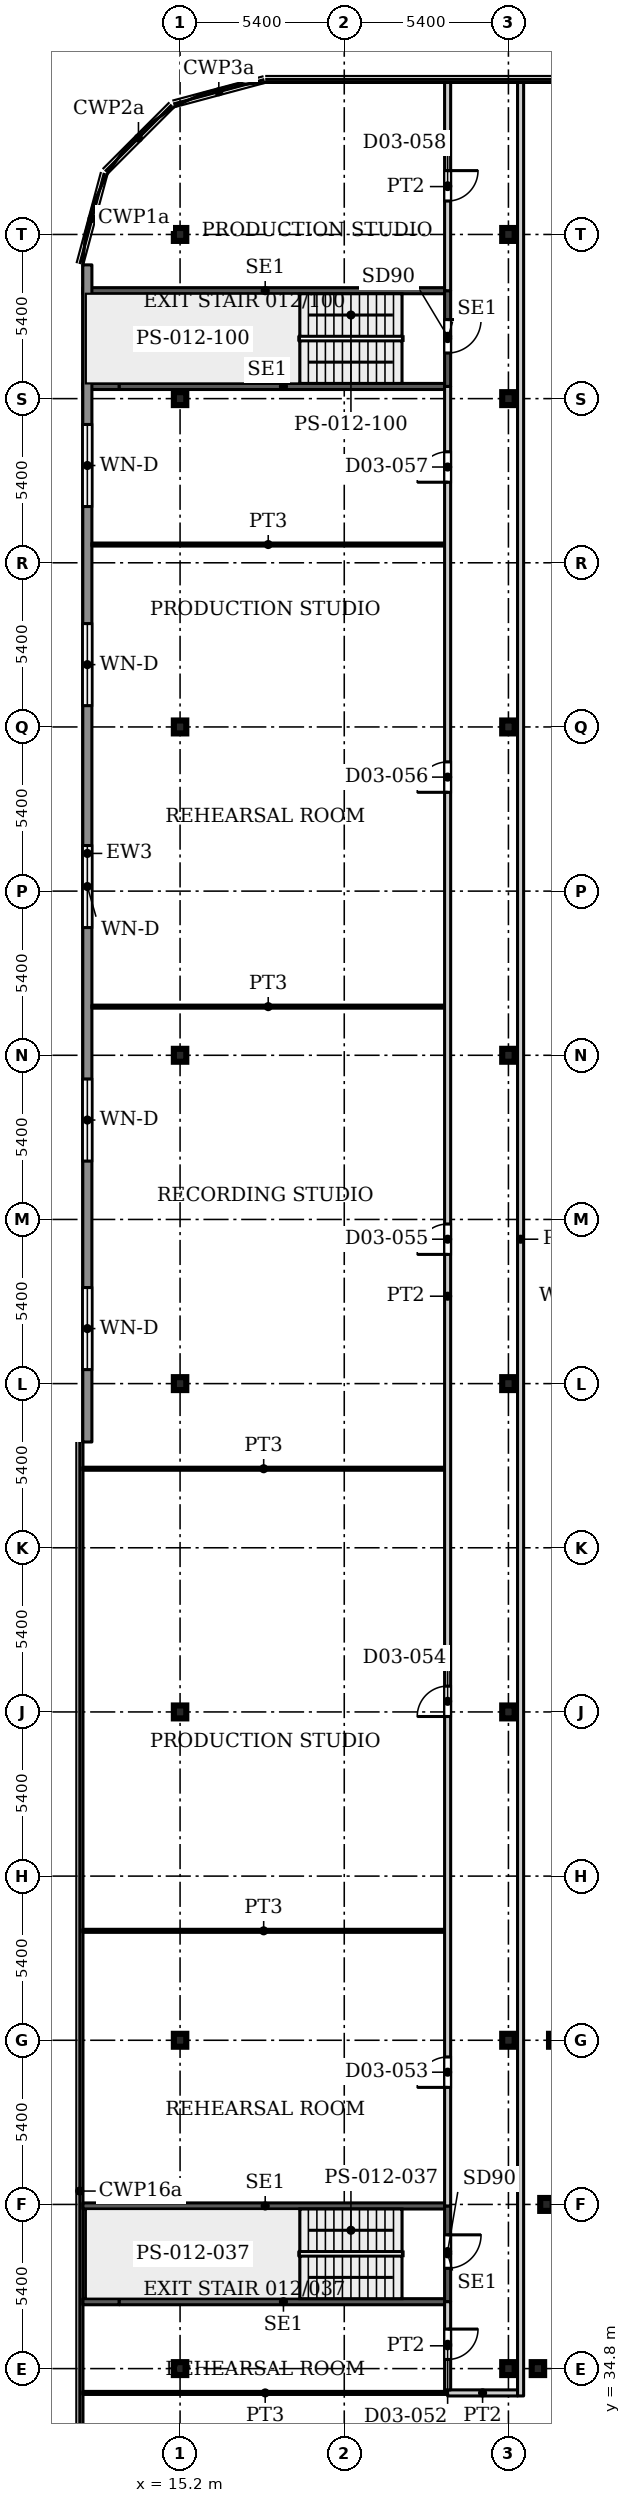
"""IFC4 building model, lengths in metres.
Left out: names, types, materials, properties, quantities, classifications, styles, units other than length and angle.
Written with IfcOpenShell. Run it as: python <this file> out.ifc"""

import sys

from ifc_helpers import new_model, si_unit, direction, frame, frame_2d, origin, origin_2d, place, context, subcontext, project, spatial, rectangle, i_section, extrude, source, transform, mapped, element, fill, save


model = new_model("IFC4")
c1 = context("Model", 3, precision=1e-05, world=origin(), true_north=direction((0.0, 1.0)))
c2 = subcontext(c1, "Body", "Model", "MODEL_VIEW")
j1 = project(units=[si_unit("LENGTHUNIT", "METRE"), si_unit("PLANEANGLEUNIT", "RADIAN")], contexts=[c1])
p1 = place(None, origin())
s1 = spatial("IfcSite", under=j1, at=p1, CompositionType="ELEMENT")
p2 = place(p1, origin())
s2 = spatial("IfcBuilding", under=s1, at=p2, CompositionType="ELEMENT")
p3 = place(p2, frame((0.0, 0.0, 17.0)))
s3 = spatial("IfcBuildingStorey", under=s2, at=p3, CompositionType="ELEMENT", Elevation=17.0)
for number, where, z_axis, x_axis in (
    (1, (15.2, 34.8, 0.0), (0.0, 0.0, 1.0), (1.0, 0.0, 0.0)),
    (2, (26.0, 34.8, 0.0), (0.0, 0.0, 1.0), (1.0, 0.0, 0.0)),
    (3, (15.2, 45.6, 0.0), (0.0, 0.0, 1.0), (1.0, 0.0, 0.0)),
    (4, (26.0, 45.6, 0.0), (0.0, 0.0, 1.0), (1.0, 0.0, 0.0)),
    (5, (15.2, 56.4, 0.0), (0.0, 0.0, 1.0), (1.0, 0.0, 0.0)),
    (6, (26.0, 56.4, 0.0), (0.0, 0.0, 1.0), (1.0, 0.0, 0.0)),
    (7, (15.2, 67.2, 0.0), (0.0, 0.0, 1.0), (1.0, 0.0, 0.0)),
    (8, (26.0, 67.2, 0.0), (0.0, 0.0, 1.0), (1.0, 0.0, 0.0)),
    (9, (15.2, 78.0, 0.0), (0.0, 0.0, 1.0), (1.0, 0.0, 0.0)),
    (10, (26.0, 78.0, 0.0), (0.0, 0.0, 1.0), (1.0, 0.0, 0.0)),
    (11, (15.2, 88.8, 0.0), (0.0, 0.0, 1.0), (1.0, 0.0, 0.0)),
    (12, (26.0, 88.8, 0.0), (0.0, 0.0, 1.0), (1.0, 0.0, 0.0)),
    (13, (15.2, 99.6, 0.0), (0.0, 0.0, 1.0), (1.0, 0.0, 0.0)),
    (14, (26.0, 99.6, 0.0), (0.0, 0.0, 1.0), (1.0, 0.0, 0.0)),
    (15, (15.2, 105.0, 0.0), (0.0, 0.0, 1.0), (1.0, 0.0, 0.0)),
    (16, (26.0, 105.0, 0.0), (0.0, 0.0, 1.0), (1.0, 0.0, 0.0)),
    (17, (26.97, 34.8, 0.0), (0.0, 0.0, 1.0), (1.0, 0.0, 0.0)),
    (18, (27.25, 40.2, 0.0), (0.0, 0.0, 1.0), (1.0, 0.0, 0.0)),
    (19, (27.54, 45.6, 0.0), (0.0, 0.0, 1.0), (1.0, 0.0, 0.0)),
):
    element("IfcColumn", number, at=place(p3, frame(where, z_axis=z_axis, x_axis=x_axis)), inside=s3, PredefinedType="COLUMN", context=c2, shape_type="SweptSolid", body=[
        extrude(i_section(OverallWidth=0.409, OverallDepth=0.425, WebThickness=0.033, FlangeThickness=0.052, FilletRadius=0.013, at=origin_2d()), origin(), (0.0, 0.0, 1.0), 4.5),
    ])
p4 = place(p3, frame((12.15, 65.28, 0.0), z_axis=(0.0, 0.0, 1.0), x_axis=(0.0, 1.0, 0.0)))
e20 = element("IfcWall", 20, at=p4, inside=s3, PredefinedType="SOLIDWALL", context=c2, shape_type="SweptSolid", body=[
    extrude(rectangle(XDim=38.72, YDim=0.3, at=frame_2d((19.36, 0.0))), origin(), (0.0, 0.0, 1.0), 4.25),
])
p5 = place(p4, frame((2.38, 0.0, 0.9)))
e21 = element("IfcOpeningElement", 21, at=p5, cuts=e20, PredefinedType="OPENING", context=c2, shape_type="SweptSolid", body=[
    extrude(rectangle(XDim=2.7, YDim=2.1, at=frame_2d((1.35, 1.05))), frame((0.0, 0.16, 0.0), z_axis=(0.0, -1.0, 0.0), x_axis=(1.0, 0.0, 0.0)), (0.0, 0.0, 1.0), 0.32),
])
p6 = place(p4, frame((9.24, 0.0, 0.9)))
e22 = element("IfcOpeningElement", 22, at=p6, cuts=e20, PredefinedType="OPENING", context=c2, shape_type="SweptSolid", body=[
    extrude(rectangle(XDim=2.7, YDim=2.1, at=frame_2d((1.35, 1.05))), frame((0.0, 0.16, 0.0), z_axis=(0.0, -1.0, 0.0), x_axis=(1.0, 0.0, 0.0)), (0.0, 0.0, 1.0), 0.32),
])
p7 = place(p4, frame((16.92, 0.0, 0.9)))
e23 = element("IfcOpeningElement", 23, at=p7, cuts=e20, PredefinedType="OPENING", context=c2, shape_type="SweptSolid", body=[
    extrude(rectangle(XDim=2.7, YDim=2.1, at=frame_2d((1.35, 1.05))), frame((0.0, 0.16, 0.0), z_axis=(0.0, -1.0, 0.0), x_axis=(1.0, 0.0, 0.0)), (0.0, 0.0, 1.0), 0.32),
])
p8 = place(p4, frame((24.22, 0.0, 0.9)))
e24 = element("IfcOpeningElement", 24, at=p8, cuts=e20, PredefinedType="OPENING", context=c2, shape_type="SweptSolid", body=[
    extrude(rectangle(XDim=2.7, YDim=2.1, at=frame_2d((1.35, 1.05))), frame((0.0, 0.16, 0.0), z_axis=(0.0, -1.0, 0.0), x_axis=(1.0, 0.0, 0.0)), (0.0, 0.0, 1.0), 0.32),
])
p9 = place(p4, frame((30.77, 0.0, 0.9)))
e25 = element("IfcOpeningElement", 25, at=p9, cuts=e20, PredefinedType="OPENING", context=c2, shape_type="SweptSolid", body=[
    extrude(rectangle(XDim=2.7, YDim=2.1, at=frame_2d((1.35, 1.05))), frame((0.0, 0.16, 0.0), z_axis=(0.0, -1.0, 0.0), x_axis=(1.0, 0.0, 0.0)), (0.0, 0.0, 1.0), 0.32),
])
p10 = place(p3, frame((12.0, 37.0, 0.0), z_axis=(0.0, 0.0, 1.0), x_axis=(1.0, 0.0, 0.0)))
e26 = element("IfcWall", 26, at=p10, inside=s3, PredefinedType="SHEAR", context=c2, shape_type="SweptSolid", body=[
    extrude(rectangle(XDim=1.2, YDim=0.2, at=frame_2d((0.6, 0.0))), origin(), (0.0, 0.0, 1.0), 4.5),
])
p11 = place(p3, frame((13.2, 37.0, 0.0), z_axis=(0.0, 0.0, 1.0), x_axis=(1.0, 0.0, 0.0)))
e27 = element("IfcWall", 27, at=p11, inside=s3, PredefinedType="SHEAR", context=c2, shape_type="SweptSolid", body=[
    extrude(rectangle(XDim=10.8, YDim=0.2, at=frame_2d((5.4, 0.0))), origin(), (0.0, 0.0, 1.0), 4.5),
])
p12 = place(p3, frame((12.0, 40.15, 0.0), z_axis=(0.0, 0.0, 1.0), x_axis=(1.0, 0.0, 0.0)))
e28 = element("IfcWall", 28, at=p12, inside=s3, PredefinedType="SHEAR", context=c2, shape_type="SweptSolid", body=[
    extrude(rectangle(XDim=12.0, YDim=0.2, at=frame_2d((6.0, 0.0))), origin(), (0.0, 0.0, 1.0), 4.5),
])
p13 = place(p3, frame((24.0, 37.0, 0.0), z_axis=(0.0, 0.0, 1.0), x_axis=(0.0, 1.0, 0.0)))
e29 = element("IfcWall", 29, at=p13, inside=s3, PredefinedType="SHEAR", context=c2, shape_type="SweptSolid", body=[
    extrude(rectangle(XDim=3.15, YDim=0.2, at=frame_2d((1.575, 0.0))), origin(), (0.0, 0.0, 1.0), 4.5),
])
p14 = place(p13, frame((1.1, 0.0, 0.0)))
e30 = element("IfcOpeningElement", 30, at=p14, cuts=e29, PredefinedType="OPENING", context=c2, shape_type="SweptSolid", body=[
    extrude(rectangle(XDim=1.1, YDim=2.2, at=frame_2d((0.55, 1.1))), frame((0.0, 0.11, 0.0), z_axis=(0.0, -1.0, 0.0), x_axis=(1.0, 0.0, 0.0)), (0.0, 0.0, 1.0), 0.22),
])
p15 = place(p3, frame((12.0, 100.0, 0.0), z_axis=(0.0, 0.0, 1.0), x_axis=(1.0, 0.0, 0.0)))
e31 = element("IfcWall", 31, at=p15, inside=s3, PredefinedType="SHEAR", context=c2, shape_type="SweptSolid", body=[
    extrude(rectangle(XDim=1.2, YDim=0.2, at=frame_2d((0.6, 0.0))), origin(), (0.0, 0.0, 1.0), 4.5),
])
p16 = place(p3, frame((13.2, 100.0, 0.0), z_axis=(0.0, 0.0, 1.0), x_axis=(1.0, 0.0, 0.0)))
e32 = element("IfcWall", 32, at=p16, inside=s3, PredefinedType="SHEAR", context=c2, shape_type="SweptSolid", body=[
    extrude(rectangle(XDim=10.8, YDim=0.2, at=frame_2d((5.4, 0.0))), origin(), (0.0, 0.0, 1.0), 4.5),
])
p17 = place(p3, frame((12.0, 103.15, 0.0), z_axis=(0.0, 0.0, 1.0), x_axis=(1.0, 0.0, 0.0)))
e33 = element("IfcWall", 33, at=p17, inside=s3, PredefinedType="SHEAR", context=c2, shape_type="SweptSolid", body=[
    extrude(rectangle(XDim=12.0, YDim=0.2, at=frame_2d((6.0, 0.0))), origin(), (0.0, 0.0, 1.0), 4.5),
])
p18 = place(p3, frame((24.0, 100.0, 0.0), z_axis=(0.0, 0.0, 1.0), x_axis=(0.0, 1.0, 0.0)))
e34 = element("IfcWall", 34, at=p18, inside=s3, PredefinedType="SHEAR", context=c2, shape_type="SweptSolid", body=[
    extrude(rectangle(XDim=3.15, YDim=0.2, at=frame_2d((1.575, 0.0))), origin(), (0.0, 0.0, 1.0), 4.5),
])
p19 = place(p18, frame((1.1, 0.0, 0.0)))
e35 = element("IfcOpeningElement", 35, at=p19, cuts=e34, PredefinedType="OPENING", context=c2, shape_type="SweptSolid", body=[
    extrude(rectangle(XDim=1.1, YDim=2.2, at=frame_2d((0.55, 1.1))), frame((0.0, 0.11, 0.0), z_axis=(0.0, -1.0, 0.0), x_axis=(1.0, 0.0, 0.0)), (0.0, 0.0, 1.0), 0.22),
])
p20 = place(p3, frame((12.0, 34.0, 0.0), z_axis=(0.0, 0.0, 1.0), x_axis=(1.0, 0.0, 0.0)))
e36 = element("IfcWall", 36, at=p20, inside=s3, PredefinedType="PARTITIONING", context=c2, shape_type="SweptSolid", body=[
    extrude(rectangle(XDim=12.0, YDim=0.1, at=frame_2d((6.0, 0.0))), origin(), (0.0, 0.0, 1.0), 4.18),
])
for number, where, z_axis, x_axis in (
    (37, (12.0, 49.2, 0.0), (0.0, 0.0, 1.0), (1.0, 0.0, 0.0)),
    (38, (12.0, 64.4, 0.0), (0.0, 0.0, 1.0), (1.0, 0.0, 0.0)),
):
    element("IfcWall", number, at=place(p3, frame(where, z_axis=z_axis, x_axis=x_axis)), inside=s3, PredefinedType="PARTITIONING", context=c2, shape_type="SweptSolid", body=[
        extrude(rectangle(XDim=11.9, YDim=0.1, at=frame_2d((5.95, 0.0))), origin(), (0.0, 0.0, 1.0), 4.18),
    ])
for number, where, z_axis, x_axis in (
    (39, (12.299, 79.6, 0.0), (0.0, 0.0, 1.0), (1.0, 0.0, 0.0)),
    (40, (12.299, 94.8, 0.0), (0.0, 0.0, 1.0), (1.0, 0.0, 0.0)),
):
    element("IfcWall", number, at=place(p3, frame(where, z_axis=z_axis, x_axis=x_axis)), inside=s3, PredefinedType="PARTITIONING", context=c2, shape_type="SweptSolid", body=[
        extrude(rectangle(XDim=11.601, YDim=0.1, at=frame_2d((5.8, 0.0))), origin(), (0.0, 0.0, 1.0), 4.18),
    ])
p21 = place(p3, frame((24.0, 34.0, 0.0), z_axis=(0.0, 0.0, 1.0), x_axis=(1.0, 0.0, 0.0)))
e41 = element("IfcWall", 41, at=p21, inside=s3, PredefinedType="PARTITIONING", context=c2, shape_type="SweptSolid", body=[
    extrude(rectangle(XDim=2.3, YDim=0.2, at=frame_2d((1.15, 0.0))), origin(), (0.0, 0.0, 1.0), 4.18),
])
p22 = place(p3, frame((24.0, 34.1, 0.0), z_axis=(0.0, 0.0, 1.0), x_axis=(0.0, 1.0, 0.0)))
e42 = element("IfcWall", 42, at=p22, inside=s3, PredefinedType="PARTITIONING", context=c2, shape_type="SweptSolid", body=[
    extrude(rectangle(XDim=2.9, YDim=0.2, at=frame_2d((1.45, 0.0))), origin(), (0.0, 0.0, 1.0), 4.18),
])
p23 = place(p22, frame((1.0, 0.0, 0.0)))
e43 = element("IfcOpeningElement", 43, at=p23, cuts=e42, PredefinedType="OPENING", context=c2, shape_type="SweptSolid", body=[
    extrude(rectangle(XDim=1.0, YDim=2.1, at=frame_2d((0.5, 1.05))), frame((0.0, 0.11, 0.0), z_axis=(0.0, -1.0, 0.0), x_axis=(1.0, 0.0, 0.0)), (0.0, 0.0, 1.0), 0.22),
])
p24 = place(p3, frame((24.0, 40.15, 0.0), z_axis=(0.0, 0.0, 1.0), x_axis=(0.0, 1.0, 0.0)))
e44 = element("IfcWall", 44, at=p24, inside=s3, PredefinedType="PARTITIONING", context=c2, shape_type="SweptSolid", body=[
    extrude(rectangle(XDim=59.85, YDim=0.2, at=frame_2d((29.925, 0.0))), origin(), (0.0, 0.0, 1.0), 4.18),
])
p25 = place(p24, frame((3.9, 0.0, 0.0)))
e45 = element("IfcOpeningElement", 45, at=p25, cuts=e44, PredefinedType="OPENING", context=c2, shape_type="SweptSolid", body=[
    extrude(rectangle(XDim=1.0, YDim=2.1, at=frame_2d((0.5, 1.05))), frame((0.0, 0.11, 0.0), z_axis=(0.0, -1.0, 0.0), x_axis=(1.0, 0.0, 0.0)), (0.0, 0.0, 1.0), 0.22),
])
p26 = place(p24, frame((16.1, 0.0, 0.0)))
e46 = element("IfcOpeningElement", 46, at=p26, cuts=e44, PredefinedType="OPENING", context=c2, shape_type="SweptSolid", body=[
    extrude(rectangle(XDim=1.0, YDim=2.1, at=frame_2d((0.5, 1.05))), frame((0.0, 0.11, 0.0), z_axis=(0.0, -1.0, 0.0), x_axis=(1.0, 0.0, 0.0)), (0.0, 0.0, 1.0), 0.22),
])
p27 = place(p24, frame((31.3, 0.0, 0.0)))
e47 = element("IfcOpeningElement", 47, at=p27, cuts=e44, PredefinedType="OPENING", context=c2, shape_type="SweptSolid", body=[
    extrude(rectangle(XDim=1.0, YDim=2.1, at=frame_2d((0.5, 1.05))), frame((0.0, 0.11, 0.0), z_axis=(0.0, -1.0, 0.0), x_axis=(1.0, 0.0, 0.0)), (0.0, 0.0, 1.0), 0.22),
])
p28 = place(p24, frame((46.5, 0.0, 0.0)))
e48 = element("IfcOpeningElement", 48, at=p28, cuts=e44, PredefinedType="OPENING", context=c2, shape_type="SweptSolid", body=[
    extrude(rectangle(XDim=1.0, YDim=2.1, at=frame_2d((0.5, 1.05))), frame((0.0, 0.11, 0.0), z_axis=(0.0, -1.0, 0.0), x_axis=(1.0, 0.0, 0.0)), (0.0, 0.0, 1.0), 0.22),
])
p29 = place(p24, frame((56.7, 0.0, 0.0)))
e49 = element("IfcOpeningElement", 49, at=p29, cuts=e44, PredefinedType="OPENING", context=c2, shape_type="SweptSolid", body=[
    extrude(rectangle(XDim=1.0, YDim=2.1, at=frame_2d((0.5, 1.05))), frame((0.0, 0.11, 0.0), z_axis=(0.0, -1.0, 0.0), x_axis=(1.0, 0.0, 0.0)), (0.0, 0.0, 1.0), 0.22),
])
p30 = place(p3, frame((24.0, 103.15, 0.0), z_axis=(0.0, 0.0, 1.0), x_axis=(0.0, 1.0, 0.0)))
e50 = element("IfcWall", 50, at=p30, inside=s3, PredefinedType="PARTITIONING", context=c2, shape_type="SweptSolid", body=[
    extrude(rectangle(XDim=6.85, YDim=0.2, at=frame_2d((3.425, 0.0))), origin(), (0.0, 0.0, 1.0), 4.18),
])
p31 = place(p30, frame((2.95, 0.0, 0.0)))
e51 = element("IfcOpeningElement", 51, at=p31, cuts=e50, PredefinedType="OPENING", context=c2, shape_type="SweptSolid", body=[
    extrude(rectangle(XDim=1.0, YDim=2.1, at=frame_2d((0.5, 1.05))), frame((0.0, 0.11, 0.0), z_axis=(0.0, -1.0, 0.0), x_axis=(1.0, 0.0, 0.0)), (0.0, 0.0, 1.0), 0.22),
])
p32 = place(p3, frame((26.4, 33.9, 0.0), z_axis=(0.0, 0.0, 1.0), x_axis=(0.0, 1.0, 0.0)))
e52 = element("IfcWall", 52, at=p32, inside=s3, PredefinedType="PARTITIONING", context=c2, shape_type="SweptSolid", body=[
    extrude(rectangle(XDim=76.1, YDim=0.2, at=frame_2d((38.05, 0.0))), origin(), (0.0, 0.0, 1.0), 4.18),
])
m1 = source(origin(), c2, "Body", "SweptSolid", [
    extrude(rectangle(XDim=2.7, YDim=2.1, at=frame_2d((1.35, 1.05))), frame((0.0, 0.03, 0.0), z_axis=(0.0, -1.0, 0.0), x_axis=(1.0, 0.0, 0.0)), (0.0, 0.0, 1.0), 0.06),
])
p33 = place(p5, origin())
e53 = element("IfcWindow", 53, at=p33, inside=s3, PartitioningType="SINGLE_PANEL", PredefinedType="WINDOW", context=c2, shape_type="MappedRepresentation", body=[
    mapped(m1, transform((0.0, 0.0, 0.0), x_axis=(1.0, 0.0, 0.0), y_axis=(0.0, 1.0, 0.0), z_axis=(0.0, 0.0, 1.0), scale=1.0)),
])
fill(e21, e53)
p34 = place(p6, origin())
e54 = element("IfcWindow", 54, at=p34, inside=s3, PartitioningType="SINGLE_PANEL", PredefinedType="WINDOW", context=c2, shape_type="MappedRepresentation", body=[
    mapped(m1, transform((0.0, 0.0, 0.0), x_axis=(1.0, 0.0, 0.0), y_axis=(0.0, 1.0, 0.0), z_axis=(0.0, 0.0, 1.0), scale=1.0)),
])
fill(e22, e54)
p35 = place(p7, origin())
e55 = element("IfcWindow", 55, at=p35, inside=s3, PartitioningType="SINGLE_PANEL", PredefinedType="WINDOW", context=c2, shape_type="MappedRepresentation", body=[
    mapped(m1, transform((0.0, 0.0, 0.0), x_axis=(1.0, 0.0, 0.0), y_axis=(0.0, 1.0, 0.0), z_axis=(0.0, 0.0, 1.0), scale=1.0)),
])
fill(e23, e55)
p36 = place(p8, origin())
e56 = element("IfcWindow", 56, at=p36, inside=s3, PartitioningType="SINGLE_PANEL", PredefinedType="WINDOW", context=c2, shape_type="MappedRepresentation", body=[
    mapped(m1, transform((0.0, 0.0, 0.0), x_axis=(1.0, 0.0, 0.0), y_axis=(0.0, 1.0, 0.0), z_axis=(0.0, 0.0, 1.0), scale=1.0)),
])
fill(e24, e56)
p37 = place(p9, origin())
e57 = element("IfcWindow", 57, at=p37, inside=s3, PartitioningType="SINGLE_PANEL", PredefinedType="WINDOW", context=c2, shape_type="MappedRepresentation", body=[
    mapped(m1, transform((0.0, 0.0, 0.0), x_axis=(1.0, 0.0, 0.0), y_axis=(0.0, 1.0, 0.0), z_axis=(0.0, 0.0, 1.0), scale=1.0)),
])
fill(e25, e57)
m2 = source(origin(), c2, "Body", "SweptSolid", [
    extrude(rectangle(XDim=1.1, YDim=2.2, at=frame_2d((0.55, 1.1))), frame((0.0, 0.025, 0.0), z_axis=(0.0, -1.0, 0.0), x_axis=(1.0, 0.0, 0.0)), (0.0, 0.0, 1.0), 0.05),
])
p38 = place(p14, origin())
e58 = element("IfcDoor", 58, at=p38, inside=s3, OperationType="SINGLE_SWING_RIGHT", PredefinedType="DOOR", context=c2, shape_type="MappedRepresentation", body=[
    mapped(m2, transform((0.0, 0.0, 0.0), x_axis=(1.0, 0.0, 0.0), y_axis=(0.0, 1.0, 0.0), z_axis=(0.0, 0.0, 1.0), scale=1.0)),
])
fill(e30, e58)
p39 = place(p19, origin())
e59 = element("IfcDoor", 59, at=p39, inside=s3, OperationType="SINGLE_SWING_RIGHT", PredefinedType="DOOR", context=c2, shape_type="MappedRepresentation", body=[
    mapped(m2, transform((0.0, 0.0, 0.0), x_axis=(1.0, 0.0, 0.0), y_axis=(0.0, 1.0, 0.0), z_axis=(0.0, 0.0, 1.0), scale=1.0)),
])
fill(e35, e59)
m3 = source(origin(), c2, "Body", "SweptSolid", [
    extrude(rectangle(XDim=1.0, YDim=2.1, at=frame_2d((0.5, 1.05))), frame((0.0, 0.025, 0.0), z_axis=(0.0, -1.0, 0.0), x_axis=(1.0, 0.0, 0.0)), (0.0, 0.0, 1.0), 0.05),
])
p40 = place(p23, origin())
e60 = element("IfcDoor", 60, at=p40, inside=s3, OperationType="SINGLE_SWING_RIGHT", PredefinedType="DOOR", context=c2, shape_type="MappedRepresentation", body=[
    mapped(m3, transform((0.0, 0.0, 0.0), x_axis=(1.0, 0.0, 0.0), y_axis=(0.0, 1.0, 0.0), z_axis=(0.0, 0.0, 1.0), scale=1.0)),
])
fill(e43, e60)
p41 = place(p25, origin())
e61 = element("IfcDoor", 61, at=p41, inside=s3, OperationType="SINGLE_SWING_LEFT", PredefinedType="DOOR", context=c2, shape_type="MappedRepresentation", body=[
    mapped(m3, transform((0.0, 0.0, 0.0), x_axis=(1.0, 0.0, 0.0), y_axis=(0.0, 1.0, 0.0), z_axis=(0.0, 0.0, 1.0), scale=1.0)),
])
fill(e45, e61)
p42 = place(p26, origin())
e62 = element("IfcDoor", 62, at=p42, inside=s3, OperationType="SINGLE_SWING_LEFT", PredefinedType="DOOR", context=c2, shape_type="MappedRepresentation", body=[
    mapped(m3, transform((0.0, 0.0, 0.0), x_axis=(1.0, 0.0, 0.0), y_axis=(0.0, 1.0, 0.0), z_axis=(0.0, 0.0, 1.0), scale=1.0)),
])
fill(e46, e62)
p43 = place(p27, origin())
e63 = element("IfcDoor", 63, at=p43, inside=s3, OperationType="SINGLE_SWING_LEFT", PredefinedType="DOOR", context=c2, shape_type="MappedRepresentation", body=[
    mapped(m3, transform((0.0, 0.0, 0.0), x_axis=(1.0, 0.0, 0.0), y_axis=(0.0, 1.0, 0.0), z_axis=(0.0, 0.0, 1.0), scale=1.0)),
])
fill(e47, e63)
p44 = place(p28, origin())
e64 = element("IfcDoor", 64, at=p44, inside=s3, OperationType="SINGLE_SWING_LEFT", PredefinedType="DOOR", context=c2, shape_type="MappedRepresentation", body=[
    mapped(m3, transform((0.0, 0.0, 0.0), x_axis=(1.0, 0.0, 0.0), y_axis=(0.0, 1.0, 0.0), z_axis=(0.0, 0.0, 1.0), scale=1.0)),
])
fill(e48, e64)
p45 = place(p29, origin())
e65 = element("IfcDoor", 65, at=p45, inside=s3, OperationType="SINGLE_SWING_LEFT", PredefinedType="DOOR", context=c2, shape_type="MappedRepresentation", body=[
    mapped(m3, transform((0.0, 0.0, 0.0), x_axis=(1.0, 0.0, 0.0), y_axis=(0.0, 1.0, 0.0), z_axis=(0.0, 0.0, 1.0), scale=1.0)),
])
fill(e49, e65)
p46 = place(p31, origin())
e66 = element("IfcDoor", 66, at=p46, inside=s3, OperationType="SINGLE_SWING_RIGHT", PredefinedType="DOOR", context=c2, shape_type="MappedRepresentation", body=[
    mapped(m3, transform((0.0, 0.0, 0.0), x_axis=(1.0, 0.0, 0.0), y_axis=(0.0, 1.0, 0.0), z_axis=(0.0, 0.0, 1.0), scale=1.0)),
])
fill(e51, e66)
save(model, sys.argv[1])
